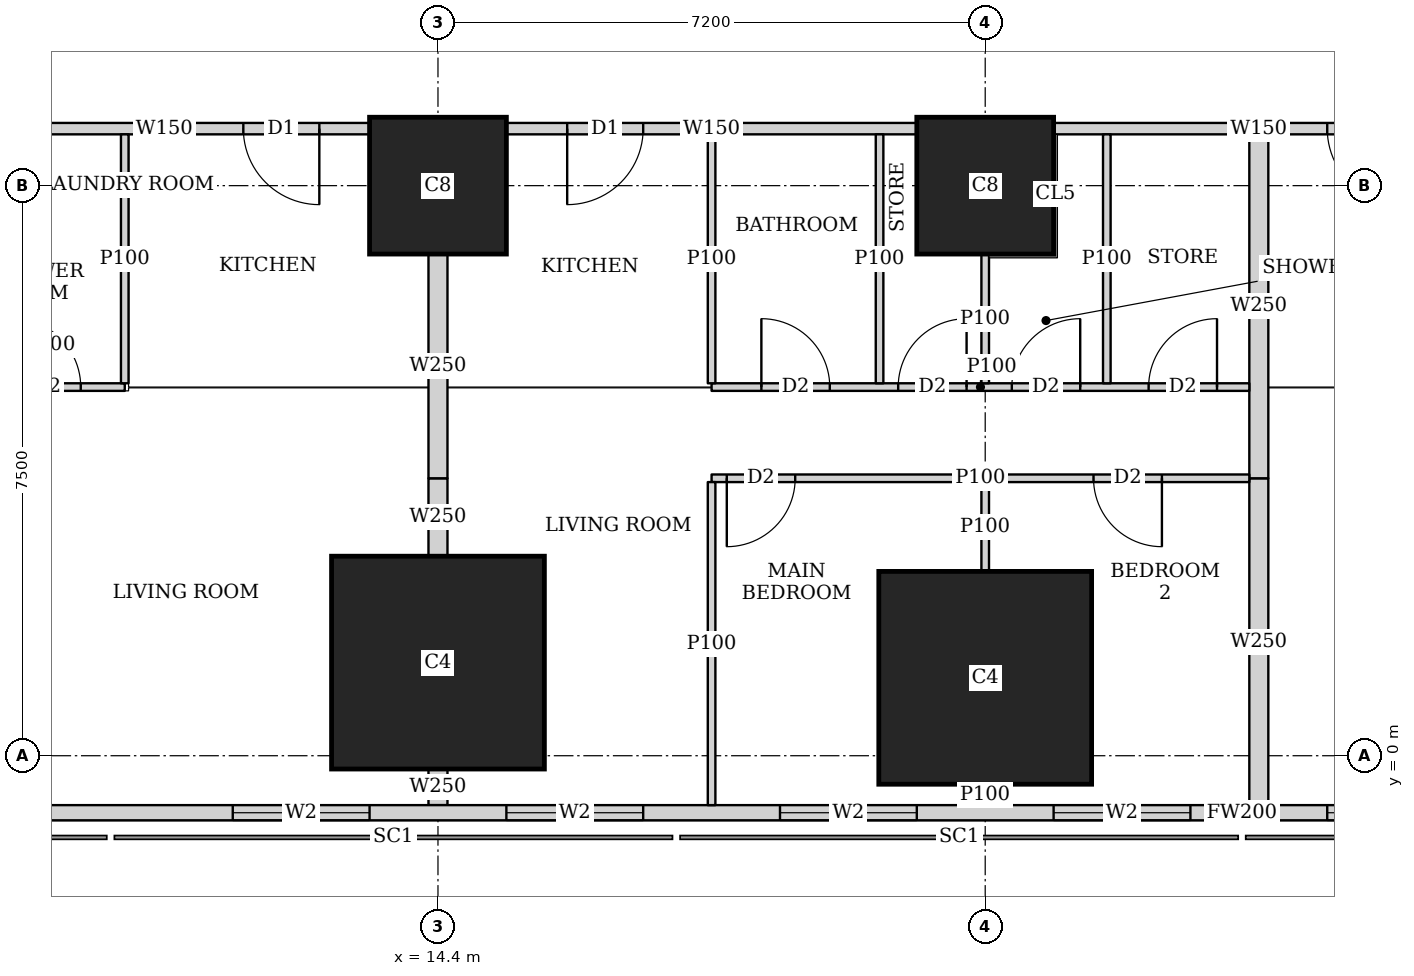
"""IFC4 building model, lengths in metres.
Left out: names, types, materials, properties, quantities, classifications, styles, units other than length and angle.
Written with IfcOpenShell. Run it as: python <this file> out.ifc"""

import sys

from ifc_helpers import new_model, si_unit, direction, frame, frame_2d, origin, origin_2d, place, context, subcontext, project, spatial, rectangle, extrude, element, fill, save


model = new_model("IFC4")
c1 = context("Model", 3, precision=1e-05, world=origin(), true_north=direction((0.0, 1.0)))
c2 = subcontext(c1, "Body", "Model", "MODEL_VIEW")
j1 = project(units=[si_unit("LENGTHUNIT", "METRE"), si_unit("PLANEANGLEUNIT", "RADIAN")], contexts=[c1])
p1 = place(None, origin())
s1 = spatial("IfcSite", under=j1, at=p1, CompositionType="ELEMENT")
p2 = place(p1, origin())
s2 = spatial("IfcBuilding", under=s1, at=p2, CompositionType="ELEMENT")
p3 = place(p2, frame((0.0, 0.0, 31.25)))
s3 = spatial("IfcBuildingStorey", under=s2, at=p3, CompositionType="ELEMENT", Elevation=31.25)
for number, where, z_axis, x_axis in (
    (1, (14.4, 1.225, 0.0), (0.0, 0.0, 1.0), (1.0, 0.0, 0.0)),
    (2, (21.6, 1.025, 0.0), (0.0, 0.0, 1.0), (1.0, 0.0, 0.0)),
):
    element("IfcColumn", number, at=place(p3, frame(where, z_axis=z_axis, x_axis=x_axis)), inside=s3, PredefinedType="COLUMN", context=c2, shape_type="SweptSolid", body=[
        extrude(rectangle(XDim=2.8, YDim=2.8, at=origin_2d()), origin(), (0.0, 0.0, 1.0), 3.75),
    ])
for number, where, z_axis, x_axis in (
    (3, (14.4, 7.5, 0.0), (0.0, 0.0, 1.0), (1.0, 0.0, 0.0)),
    (4, (21.6, 7.5, 0.0), (0.0, 0.0, 1.0), (1.0, 0.0, 0.0)),
):
    element("IfcColumn", number, at=place(p3, frame(where, z_axis=z_axis, x_axis=x_axis)), inside=s3, PredefinedType="COLUMN", context=c2, shape_type="SweptSolid", body=[
        extrude(rectangle(XDim=1.8, YDim=1.8, at=origin_2d()), origin(), (0.0, 0.0, 1.0), 3.75),
    ])
p4 = place(p3, frame((2.163, -0.75, 0.0), z_axis=(0.0, 0.0, 1.0), x_axis=(1.0, 0.0, 0.0)))
e5 = element("IfcWall", 5, at=p4, inside=s3, PredefinedType="SOLIDWALL", context=c2, shape_type="SweptSolid", body=[
    extrude(rectangle(XDim=45.628, YDim=0.2, at=frame_2d((22.814, 0.0))), origin(), (0.0, 0.0, 1.0), 3.5),
])
p5 = place(p4, frame((9.537, 0.0, 0.9)))
e6 = element("IfcOpeningElement", 6, at=p5, cuts=e5, PredefinedType="OPENING", context=c2, shape_type="SweptSolid", body=[
    extrude(rectangle(XDim=1.8, YDim=1.5, at=frame_2d((0.9, 0.75))), frame((0.0, 0.11, 0.0), z_axis=(0.0, -1.0, 0.0), x_axis=(1.0, 0.0, 0.0)), (0.0, 0.0, 1.0), 0.22),
])
p6 = place(p4, frame((13.137, 0.0, 0.9)))
e7 = element("IfcOpeningElement", 7, at=p6, cuts=e5, PredefinedType="OPENING", context=c2, shape_type="SweptSolid", body=[
    extrude(rectangle(XDim=1.8, YDim=1.5, at=frame_2d((0.9, 0.75))), frame((0.0, 0.11, 0.0), z_axis=(0.0, -1.0, 0.0), x_axis=(1.0, 0.0, 0.0)), (0.0, 0.0, 1.0), 0.22),
])
p7 = place(p4, frame((16.737, 0.0, 0.9)))
e8 = element("IfcOpeningElement", 8, at=p7, cuts=e5, PredefinedType="OPENING", context=c2, shape_type="SweptSolid", body=[
    extrude(rectangle(XDim=1.8, YDim=1.5, at=frame_2d((0.9, 0.75))), frame((0.0, 0.11, 0.0), z_axis=(0.0, -1.0, 0.0), x_axis=(1.0, 0.0, 0.0)), (0.0, 0.0, 1.0), 0.22),
])
p8 = place(p4, frame((20.337, 0.0, 0.9)))
e9 = element("IfcOpeningElement", 9, at=p8, cuts=e5, PredefinedType="OPENING", context=c2, shape_type="SweptSolid", body=[
    extrude(rectangle(XDim=1.8, YDim=1.5, at=frame_2d((0.9, 0.75))), frame((0.0, 0.11, 0.0), z_axis=(0.0, -1.0, 0.0), x_axis=(1.0, 0.0, 0.0)), (0.0, 0.0, 1.0), 0.22),
])
p9 = place(p4, frame((23.937, 0.0, 0.9)))
e10 = element("IfcOpeningElement", 10, at=p9, cuts=e5, PredefinedType="OPENING", context=c2, shape_type="SweptSolid", body=[
    extrude(rectangle(XDim=1.8, YDim=1.5, at=frame_2d((0.9, 0.75))), frame((0.0, 0.11, 0.0), z_axis=(0.0, -1.0, 0.0), x_axis=(1.0, 0.0, 0.0)), (0.0, 0.0, 1.0), 0.22),
])
p10 = place(p4, frame((27.537, 0.0, 0.9)))
e11 = element("IfcOpeningElement", 11, at=p10, cuts=e5, PredefinedType="OPENING", context=c2, shape_type="SweptSolid", body=[
    extrude(rectangle(XDim=1.8, YDim=1.5, at=frame_2d((0.9, 0.75))), frame((0.0, 0.11, 0.0), z_axis=(0.0, -1.0, 0.0), x_axis=(1.0, 0.0, 0.0)), (0.0, 0.0, 1.0), 0.22),
])
p11 = place(p4, frame((31.137, 0.0, 0.9)))
e12 = element("IfcOpeningElement", 12, at=p11, cuts=e5, PredefinedType="OPENING", context=c2, shape_type="SweptSolid", body=[
    extrude(rectangle(XDim=1.8, YDim=1.5, at=frame_2d((0.9, 0.75))), frame((0.0, 0.11, 0.0), z_axis=(0.0, -1.0, 0.0), x_axis=(1.0, 0.0, 0.0)), (0.0, 0.0, 1.0), 0.22),
])
p12 = place(p4, frame((34.737, 0.0, 0.9)))
e13 = element("IfcOpeningElement", 13, at=p12, cuts=e5, PredefinedType="OPENING", context=c2, shape_type="SweptSolid", body=[
    extrude(rectangle(XDim=1.8, YDim=1.5, at=frame_2d((0.9, 0.75))), frame((0.0, 0.11, 0.0), z_axis=(0.0, -1.0, 0.0), x_axis=(1.0, 0.0, 0.0)), (0.0, 0.0, 1.0), 0.22),
])
p13 = place(p3, frame((27.899, 8.25, 0.0), z_axis=(0.0, 0.0, 1.0), x_axis=(-1.0, 0.0, 0.0)))
e14 = element("IfcWall", 14, at=p13, inside=s3, PredefinedType="SOLIDWALL", context=c2, shape_type="SweptSolid", body=[
    extrude(rectangle(XDim=5.398, YDim=0.15, at=frame_2d((2.699, 0.0))), origin(), (0.0, 0.0, 1.0), 3.5),
])
p14 = place(p13, frame((0.799, 0.0, 0.0)))
e15 = element("IfcOpeningElement", 15, at=p14, cuts=e14, PredefinedType="OPENING", context=c2, shape_type="SweptSolid", body=[
    extrude(rectangle(XDim=1.0, YDim=2.1, at=frame_2d((0.5, 1.05))), frame((0.0, 0.085, 0.0), z_axis=(0.0, -1.0, 0.0), x_axis=(1.0, 0.0, 0.0)), (0.0, 0.0, 1.0), 0.17),
])
p15 = place(p3, frame((20.699, 8.25, 0.0), z_axis=(0.0, 0.0, 1.0), x_axis=(-1.0, 0.0, 0.0)))
e16 = element("IfcWall", 16, at=p15, inside=s3, PredefinedType="SOLIDWALL", context=c2, shape_type="SweptSolid", body=[
    extrude(rectangle(XDim=5.398, YDim=0.15, at=frame_2d((2.699, 0.0))), origin(), (0.0, 0.0, 1.0), 3.5),
])
p16 = place(p15, frame((3.599, 0.0, 0.0)))
e17 = element("IfcOpeningElement", 17, at=p16, cuts=e16, PredefinedType="OPENING", context=c2, shape_type="SweptSolid", body=[
    extrude(rectangle(XDim=1.0, YDim=2.1, at=frame_2d((0.5, 1.05))), frame((0.0, 0.085, 0.0), z_axis=(0.0, -1.0, 0.0), x_axis=(1.0, 0.0, 0.0)), (0.0, 0.0, 1.0), 0.17),
])
p17 = place(p3, frame((13.499, 8.25, 0.0), z_axis=(0.0, 0.0, 1.0), x_axis=(-1.0, 0.0, 0.0)))
e18 = element("IfcWall", 18, at=p17, inside=s3, PredefinedType="SOLIDWALL", context=c2, shape_type="SweptSolid", body=[
    extrude(rectangle(XDim=5.399, YDim=0.15, at=frame_2d((2.699, 0.0))), origin(), (0.0, 0.0, 1.0), 3.5),
])
p18 = place(p17, frame((0.66, 0.0, 0.0)))
e19 = element("IfcOpeningElement", 19, at=p18, cuts=e18, PredefinedType="OPENING", context=c2, shape_type="SweptSolid", body=[
    extrude(rectangle(XDim=1.0, YDim=2.1, at=frame_2d((0.5, 1.05))), frame((0.0, 0.085, 0.0), z_axis=(0.0, -1.0, 0.0), x_axis=(1.0, 0.0, 0.0)), (0.0, 0.0, 1.0), 0.17),
])
p19 = place(p3, frame((10.279, 4.85, 0.0), z_axis=(0.0, 0.0, 1.0), x_axis=(-1.0, 0.0, 0.0)))
e20 = element("IfcWall", 20, at=p19, inside=s3, PredefinedType="PARTITIONING", context=c2, shape_type="SweptSolid", body=[
    extrude(rectangle(XDim=1.954, YDim=0.1, at=frame_2d((0.977, 0.0))), origin(), (0.0, 0.0, 1.0), 3.5),
])
p20 = place(p19, frame((0.579, 0.0, 0.0)))
e21 = element("IfcOpeningElement", 21, at=p20, cuts=e20, PredefinedType="OPENING", context=c2, shape_type="SweptSolid", body=[
    extrude(rectangle(XDim=0.9, YDim=2.1, at=frame_2d((0.45, 1.05))), frame((0.0, 0.06, 0.0), z_axis=(0.0, -1.0, 0.0), x_axis=(1.0, 0.0, 0.0)), (0.0, 0.0, 1.0), 0.12),
])
p21 = place(p3, frame((10.279, 4.9, 0.0), z_axis=(0.0, 0.0, 1.0), x_axis=(0.0, 1.0, 0.0)))
e22 = element("IfcWall", 22, at=p21, inside=s3, PredefinedType="PARTITIONING", context=c2, shape_type="SweptSolid", body=[
    extrude(rectangle(XDim=3.275, YDim=0.1, at=frame_2d((1.638, 0.0))), origin(), (0.0, 0.0, 1.0), 3.5),
])
p22 = place(p3, frame((25.075, 3.65, 0.0), z_axis=(0.0, 0.0, 1.0), x_axis=(-1.0, 0.0, 0.0)))
e23 = element("IfcWall", 23, at=p22, inside=s3, PredefinedType="PARTITIONING", context=c2, shape_type="SweptSolid", body=[
    extrude(rectangle(XDim=7.075, YDim=0.1, at=frame_2d((3.538, 0.0))), origin(), (0.0, 0.0, 1.0), 3.5),
])
p23 = place(p22, frame((5.975, 0.0, 0.0)))
e24 = element("IfcOpeningElement", 24, at=p23, cuts=e23, PredefinedType="OPENING", context=c2, shape_type="SweptSolid", body=[
    extrude(rectangle(XDim=0.9, YDim=2.1, at=frame_2d((0.45, 1.05))), frame((0.0, 0.06, 0.0), z_axis=(0.0, -1.0, 0.0), x_axis=(1.0, 0.0, 0.0)), (0.0, 0.0, 1.0), 0.12),
])
p24 = place(p22, frame((1.15, 0.0, 0.0)))
e25 = element("IfcOpeningElement", 25, at=p24, cuts=e23, PredefinedType="OPENING", context=c2, shape_type="SweptSolid", body=[
    extrude(rectangle(XDim=0.9, YDim=2.1, at=frame_2d((0.45, 1.05))), frame((0.0, 0.06, 0.0), z_axis=(0.0, -1.0, 0.0), x_axis=(1.0, 0.0, 0.0)), (0.0, 0.0, 1.0), 0.12),
])
p25 = place(p3, frame((25.075, 4.85, 0.0), z_axis=(0.0, 0.0, 1.0), x_axis=(-1.0, 0.0, 0.0)))
e26 = element("IfcWall", 26, at=p25, inside=s3, PredefinedType="PARTITIONING", context=c2, shape_type="SweptSolid", body=[
    extrude(rectangle(XDim=7.075, YDim=0.1, at=frame_2d((3.538, 0.0))), origin(), (0.0, 0.0, 1.0), 3.5),
])
p26 = place(p25, frame((5.52, 0.0, 0.0)))
e27 = element("IfcOpeningElement", 27, at=p26, cuts=e26, PredefinedType="OPENING", context=c2, shape_type="SweptSolid", body=[
    extrude(rectangle(XDim=0.9, YDim=2.1, at=frame_2d((0.45, 1.05))), frame((0.0, 0.06, 0.0), z_axis=(0.0, -1.0, 0.0), x_axis=(1.0, 0.0, 0.0)), (0.0, 0.0, 1.0), 0.12),
])
p27 = place(p25, frame((2.225, 0.0, 0.0)))
e28 = element("IfcOpeningElement", 28, at=p27, cuts=e26, PredefinedType="OPENING", context=c2, shape_type="SweptSolid", body=[
    extrude(rectangle(XDim=0.9, YDim=2.1, at=frame_2d((0.45, 1.05))), frame((0.0, 0.06, 0.0), z_axis=(0.0, -1.0, 0.0), x_axis=(1.0, 0.0, 0.0)), (0.0, 0.0, 1.0), 0.12),
])
p28 = place(p25, frame((3.72, 0.0, 0.0)))
e29 = element("IfcOpeningElement", 29, at=p28, cuts=e26, PredefinedType="OPENING", context=c2, shape_type="SweptSolid", body=[
    extrude(rectangle(XDim=0.9, YDim=2.1, at=frame_2d((0.45, 1.05))), frame((0.0, 0.06, 0.0), z_axis=(0.0, -1.0, 0.0), x_axis=(1.0, 0.0, 0.0)), (0.0, 0.0, 1.0), 0.12),
])
p29 = place(p25, frame((0.425, 0.0, 0.0)))
e30 = element("IfcOpeningElement", 30, at=p29, cuts=e26, PredefinedType="OPENING", context=c2, shape_type="SweptSolid", body=[
    extrude(rectangle(XDim=0.9, YDim=2.1, at=frame_2d((0.45, 1.05))), frame((0.0, 0.06, 0.0), z_axis=(0.0, -1.0, 0.0), x_axis=(1.0, 0.0, 0.0)), (0.0, 0.0, 1.0), 0.12),
])
p30 = place(p3, frame((18.0, -0.65, 0.0), z_axis=(0.0, 0.0, 1.0), x_axis=(0.0, 1.0, 0.0)))
e31 = element("IfcWall", 31, at=p30, inside=s3, PredefinedType="PARTITIONING", context=c2, shape_type="SweptSolid", body=[
    extrude(rectangle(XDim=4.25, YDim=0.1, at=frame_2d((2.125, 0.0))), origin(), (0.0, 0.0, 1.0), 2.05),
])
p31 = place(p3, frame((21.6, -0.65, 0.0), z_axis=(0.0, 0.0, 1.0), x_axis=(0.0, 1.0, 0.0)))
e32 = element("IfcWall", 32, at=p31, inside=s3, PredefinedType="PARTITIONING", context=c2, shape_type="SweptSolid", body=[
    extrude(rectangle(XDim=0.274, YDim=0.1, at=frame_2d((0.137, 0.0))), origin(), (0.0, 0.0, 1.0), 3.5),
])
p32 = place(p3, frame((21.6, 2.426, 0.0), z_axis=(0.0, 0.0, 1.0), x_axis=(0.0, 1.0, 0.0)))
e33 = element("IfcWall", 33, at=p32, inside=s3, PredefinedType="PARTITIONING", context=c2, shape_type="SweptSolid", body=[
    extrude(rectangle(XDim=1.174, YDim=0.1, at=frame_2d((0.587, 0.0))), origin(), (0.0, 0.0, 1.0), 3.5),
])
p33 = place(p3, frame((18.0, 4.9, 0.0), z_axis=(0.0, 0.0, 1.0), x_axis=(0.0, 1.0, 0.0)))
e34 = element("IfcWall", 34, at=p33, inside=s3, PredefinedType="PARTITIONING", context=c2, shape_type="SweptSolid", body=[
    extrude(rectangle(XDim=3.275, YDim=0.1, at=frame_2d((1.638, 0.0))), origin(), (0.0, 0.0, 1.0), 3.5),
])
p34 = place(p3, frame((21.6, 4.9, 0.0), z_axis=(0.0, 0.0, 1.0), x_axis=(0.0, 1.0, 0.0)))
e35 = element("IfcWall", 35, at=p34, inside=s3, PredefinedType="PARTITIONING", context=c2, shape_type="SweptSolid", body=[
    extrude(rectangle(XDim=1.699, YDim=0.1, at=frame_2d((0.85, 0.0))), origin(), (0.0, 0.0, 1.0), 3.5),
])
for number, where, z_axis, x_axis in (
    (36, (20.21, 4.9, 0.0), (0.0, 0.0, 1.0), (0.0, 1.0, 0.0)),
    (37, (23.2, 4.9, 0.0), (0.0, 0.0, 1.0), (0.0, 1.0, 0.0)),
):
    element("IfcWall", number, at=place(p3, frame(where, z_axis=z_axis, x_axis=x_axis)), inside=s3, PredefinedType="PARTITIONING", context=c2, shape_type="SweptSolid", body=[
        extrude(rectangle(XDim=3.275, YDim=0.1, at=frame_2d((1.638, 0.0))), origin(), (0.0, 0.0, 1.0), 3.5),
    ])
p35 = place(p3, frame((14.4, -0.65, 0.0), z_axis=(0.0, 0.0, 1.0), x_axis=(0.0, 1.0, 0.0)))
e38 = element("IfcWall", 38, at=p35, inside=s3, PredefinedType="SOLIDWALL", context=c2, shape_type="SweptSolid", body=[
    extrude(rectangle(XDim=0.474, YDim=0.25, at=frame_2d((0.237, 0.0))), origin(), (0.0, 0.0, 1.0), 3.5),
])
p36 = place(p3, frame((14.4, 2.626, 0.0), z_axis=(0.0, 0.0, 1.0), x_axis=(0.0, 1.0, 0.0)))
e39 = element("IfcWall", 39, at=p36, inside=s3, PredefinedType="SOLIDWALL", context=c2, shape_type="SweptSolid", body=[
    extrude(rectangle(XDim=1.024, YDim=0.25, at=frame_2d((0.512, 0.0))), origin(), (0.0, 0.0, 1.0), 3.5),
])
p37 = place(p3, frame((14.4, 3.65, 0.0), z_axis=(0.0, 0.0, 1.0), x_axis=(0.0, 1.0, 0.0)))
e40 = element("IfcWall", 40, at=p37, inside=s3, PredefinedType="SOLIDWALL", context=c2, shape_type="SweptSolid", body=[
    extrude(rectangle(XDim=2.949, YDim=0.25, at=frame_2d((1.475, 0.0))), origin(), (0.0, 0.0, 1.0), 3.5),
])
p38 = place(p3, frame((25.2, -0.65, 0.0), z_axis=(0.0, 0.0, 1.0), x_axis=(0.0, 1.0, 0.0)))
e41 = element("IfcWall", 41, at=p38, inside=s3, PredefinedType="SOLIDWALL", context=c2, shape_type="SweptSolid", body=[
    extrude(rectangle(XDim=4.3, YDim=0.25, at=frame_2d((2.15, 0.0))), origin(), (0.0, 0.0, 1.0), 2.05),
])
p39 = place(p3, frame((25.2, 3.65, 0.0), z_axis=(0.0, 0.0, 1.0), x_axis=(0.0, 1.0, 0.0)))
e42 = element("IfcWall", 42, at=p39, inside=s3, PredefinedType="SOLIDWALL", context=c2, shape_type="SweptSolid", body=[
    extrude(rectangle(XDim=4.525, YDim=0.25, at=frame_2d((2.263, 0.0))), origin(), (0.0, 0.0, 1.0), 3.5),
])
p40 = place(p5, origin())
e43 = element("IfcWindow", 43, at=p40, inside=s3, PartitioningType="SINGLE_PANEL", PredefinedType="WINDOW", context=c2, shape_type="SweptSolid", body=[
    extrude(rectangle(XDim=1.8, YDim=1.5, at=frame_2d((0.9, 0.75))), frame((0.0, 0.03, 0.0), z_axis=(0.0, -1.0, 0.0), x_axis=(1.0, 0.0, 0.0)), (0.0, 0.0, 1.0), 0.06),
])
fill(e6, e43)
p41 = place(p6, origin())
e44 = element("IfcWindow", 44, at=p41, inside=s3, PartitioningType="SINGLE_PANEL", PredefinedType="WINDOW", context=c2, shape_type="SweptSolid", body=[
    extrude(rectangle(XDim=1.8, YDim=1.5, at=frame_2d((0.9, 0.75))), frame((0.0, 0.03, 0.0), z_axis=(0.0, -1.0, 0.0), x_axis=(1.0, 0.0, 0.0)), (0.0, 0.0, 1.0), 0.06),
])
fill(e7, e44)
p42 = place(p7, origin())
e45 = element("IfcWindow", 45, at=p42, inside=s3, PartitioningType="SINGLE_PANEL", PredefinedType="WINDOW", context=c2, shape_type="SweptSolid", body=[
    extrude(rectangle(XDim=1.8, YDim=1.5, at=frame_2d((0.9, 0.75))), frame((0.0, 0.03, 0.0), z_axis=(0.0, -1.0, 0.0), x_axis=(1.0, 0.0, 0.0)), (0.0, 0.0, 1.0), 0.06),
])
fill(e8, e45)
p43 = place(p8, origin())
e46 = element("IfcWindow", 46, at=p43, inside=s3, PartitioningType="SINGLE_PANEL", PredefinedType="WINDOW", context=c2, shape_type="SweptSolid", body=[
    extrude(rectangle(XDim=1.8, YDim=1.5, at=frame_2d((0.9, 0.75))), frame((0.0, 0.03, 0.0), z_axis=(0.0, -1.0, 0.0), x_axis=(1.0, 0.0, 0.0)), (0.0, 0.0, 1.0), 0.06),
])
fill(e9, e46)
p44 = place(p9, origin())
e47 = element("IfcWindow", 47, at=p44, inside=s3, PartitioningType="SINGLE_PANEL", PredefinedType="WINDOW", context=c2, shape_type="SweptSolid", body=[
    extrude(rectangle(XDim=1.8, YDim=1.5, at=frame_2d((0.9, 0.75))), frame((0.0, 0.03, 0.0), z_axis=(0.0, -1.0, 0.0), x_axis=(1.0, 0.0, 0.0)), (0.0, 0.0, 1.0), 0.06),
])
fill(e10, e47)
p45 = place(p20, origin())
e48 = element("IfcDoor", 48, at=p45, inside=s3, OperationType="SINGLE_SWING_LEFT", PredefinedType="DOOR", context=c2, shape_type="SweptSolid", body=[
    extrude(rectangle(XDim=0.9, YDim=2.1, at=frame_2d((0.45, 1.05))), frame((0.0, 0.025, 0.0), z_axis=(0.0, -1.0, 0.0), x_axis=(1.0, 0.0, 0.0)), (0.0, 0.0, 1.0), 0.05),
])
fill(e21, e48)
p46 = place(p18, origin())
e49 = element("IfcDoor", 49, at=p46, inside=s3, OperationType="SINGLE_SWING_LEFT", PredefinedType="DOOR", context=c2, shape_type="SweptSolid", body=[
    extrude(rectangle(XDim=1.0, YDim=2.1, at=frame_2d((0.5, 1.05))), frame((0.0, 0.025, 0.0), z_axis=(0.0, -1.0, 0.0), x_axis=(1.0, 0.0, 0.0)), (0.0, 0.0, 1.0), 0.05),
])
fill(e19, e49)
p47 = place(p23, origin())
e50 = element("IfcDoor", 50, at=p47, inside=s3, OperationType="SINGLE_SWING_RIGHT", PredefinedType="DOOR", context=c2, shape_type="SweptSolid", body=[
    extrude(rectangle(XDim=0.9, YDim=2.1, at=frame_2d((0.45, 1.05))), frame((0.0, 0.025, 0.0), z_axis=(0.0, -1.0, 0.0), x_axis=(1.0, 0.0, 0.0)), (0.0, 0.0, 1.0), 0.05),
])
fill(e24, e50)
p48 = place(p24, origin())
e51 = element("IfcDoor", 51, at=p48, inside=s3, OperationType="SINGLE_SWING_LEFT", PredefinedType="DOOR", context=c2, shape_type="SweptSolid", body=[
    extrude(rectangle(XDim=0.9, YDim=2.1, at=frame_2d((0.45, 1.05))), frame((0.0, 0.025, 0.0), z_axis=(0.0, -1.0, 0.0), x_axis=(1.0, 0.0, 0.0)), (0.0, 0.0, 1.0), 0.05),
])
fill(e25, e51)
p49 = place(p26, origin())
e52 = element("IfcDoor", 52, at=p49, inside=s3, OperationType="SINGLE_SWING_LEFT", PredefinedType="DOOR", context=c2, shape_type="SweptSolid", body=[
    extrude(rectangle(XDim=0.9, YDim=2.1, at=frame_2d((0.45, 1.05))), frame((0.0, 0.025, 0.0), z_axis=(0.0, -1.0, 0.0), x_axis=(1.0, 0.0, 0.0)), (0.0, 0.0, 1.0), 0.05),
])
fill(e27, e52)
p50 = place(p27, origin())
e53 = element("IfcDoor", 53, at=p50, inside=s3, OperationType="SINGLE_SWING_RIGHT", PredefinedType="DOOR", context=c2, shape_type="SweptSolid", body=[
    extrude(rectangle(XDim=0.9, YDim=2.1, at=frame_2d((0.45, 1.05))), frame((0.0, 0.025, 0.0), z_axis=(0.0, -1.0, 0.0), x_axis=(1.0, 0.0, 0.0)), (0.0, 0.0, 1.0), 0.05),
])
fill(e28, e53)
p51 = place(p28, origin())
e54 = element("IfcDoor", 54, at=p51, inside=s3, OperationType="SINGLE_SWING_RIGHT", PredefinedType="DOOR", context=c2, shape_type="SweptSolid", body=[
    extrude(rectangle(XDim=0.9, YDim=2.1, at=frame_2d((0.45, 1.05))), frame((0.0, 0.025, 0.0), z_axis=(0.0, -1.0, 0.0), x_axis=(1.0, 0.0, 0.0)), (0.0, 0.0, 1.0), 0.05),
])
fill(e29, e54)
p52 = place(p29, origin())
e55 = element("IfcDoor", 55, at=p52, inside=s3, OperationType="SINGLE_SWING_RIGHT", PredefinedType="DOOR", context=c2, shape_type="SweptSolid", body=[
    extrude(rectangle(XDim=0.9, YDim=2.1, at=frame_2d((0.45, 1.05))), frame((0.0, 0.025, 0.0), z_axis=(0.0, -1.0, 0.0), x_axis=(1.0, 0.0, 0.0)), (0.0, 0.0, 1.0), 0.05),
])
fill(e30, e55)
p53 = place(p16, origin())
e56 = element("IfcDoor", 56, at=p53, inside=s3, OperationType="SINGLE_SWING_RIGHT", PredefinedType="DOOR", context=c2, shape_type="SweptSolid", body=[
    extrude(rectangle(XDim=1.0, YDim=2.1, at=frame_2d((0.5, 1.05))), frame((0.0, 0.025, 0.0), z_axis=(0.0, -1.0, 0.0), x_axis=(1.0, 0.0, 0.0)), (0.0, 0.0, 1.0), 0.05),
])
fill(e17, e56)
p54 = place(p14, origin())
e57 = element("IfcDoor", 57, at=p54, inside=s3, OperationType="SINGLE_SWING_LEFT", PredefinedType="DOOR", context=c2, shape_type="SweptSolid", body=[
    extrude(rectangle(XDim=1.0, YDim=2.1, at=frame_2d((0.5, 1.05))), frame((0.0, 0.025, 0.0), z_axis=(0.0, -1.0, 0.0), x_axis=(1.0, 0.0, 0.0)), (0.0, 0.0, 1.0), 0.05),
])
fill(e15, e57)
save(model, sys.argv[1])
